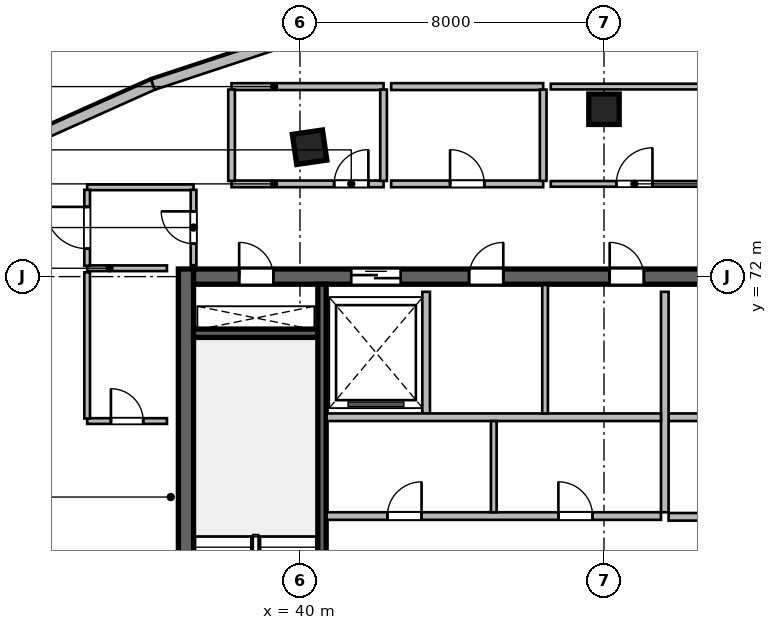
"""IFC4 building model, lengths in metres.
Left out: names, types, materials, properties, quantities, classifications, styles, units other than length and angle.
Written with IfcOpenShell. Run it as: python <this file> out.ifc"""

import sys

from ifc_helpers import new_model, si_unit, direction, frame, frame_2d, origin, origin_2d, place, context, subcontext, project, spatial, rectangle, extrude, source, transform, mapped, element, fill, save


model = new_model("IFC4")
c1 = context("Model", 3, precision=1e-05, world=origin(), true_north=direction((0.0, 1.0)))
c2 = subcontext(c1, "Body", "Model", "MODEL_VIEW")
j1 = project(units=[si_unit("LENGTHUNIT", "METRE"), si_unit("PLANEANGLEUNIT", "RADIAN")], contexts=[c1])
p1 = place(None, origin())
s1 = spatial("IfcSite", under=j1, at=p1, CompositionType="ELEMENT")
p2 = place(p1, origin())
s2 = spatial("IfcBuilding", under=s1, at=p2, CompositionType="ELEMENT")
p3 = place(p2, frame((0.0, 0.0, 264.0)))
s3 = spatial("IfcBuildingStorey", under=s2, at=p3, CompositionType="ELEMENT", Elevation=264.0)
m1 = source(origin(), c2, "Body", "SweptSolid", [
    extrude(rectangle(XDim=12.0, YDim=0.4, at=frame_2d((6.0, 0.0))), origin(), (0.0, 0.0, 1.0), 3.9),
])
p4 = place(p3, frame((37.0, 60.2, 0.0), z_axis=(0.0, 0.0, 1.0), x_axis=(0.0, 1.0, 0.0)))
e1 = element("IfcWall", 1, at=p4, inside=s3, PredefinedType="SHEAR", context=c2, shape_type="MappedRepresentation", body=[
    mapped(m1, transform((0.0, 0.0, 0.0), scale=1.0)),
])
m2 = source(origin(), c2, "Body", "SweptSolid", [
    extrude(rectangle(XDim=21.6, YDim=0.4, at=frame_2d((10.8, 0.0))), origin(), (0.0, 0.0, 1.0), 3.9),
])
p5 = place(p3, frame((37.2, 72.0, 0.0), z_axis=(0.0, 0.0, 1.0), x_axis=(1.0, 0.0, 0.0)))
e2 = element("IfcWall", 2, at=p5, inside=s3, PredefinedType="SHEAR", context=c2, shape_type="MappedRepresentation", body=[
    mapped(m2, transform((0.0, 0.0, 0.0), scale=1.0)),
])
p6 = place(p5, frame((1.2, 0.0, 0.0)))
e3 = element("IfcOpeningElement", 3, at=p6, cuts=e2, PredefinedType="OPENING", context=c2, shape_type="SweptSolid", body=[
    extrude(rectangle(XDim=0.9, YDim=2.1, at=frame_2d((0.45, 1.05))), frame((0.0, 0.21, 0.0), z_axis=(0.0, -1.0, 0.0), x_axis=(1.0, 0.0, 0.0)), (0.0, 0.0, 1.0), 0.42),
])
p7 = place(p5, frame((14.7, 0.0, 0.0)))
e4 = element("IfcOpeningElement", 4, at=p7, cuts=e2, PredefinedType="OPENING", context=c2, shape_type="SweptSolid", body=[
    extrude(rectangle(XDim=1.2, YDim=2.15, at=frame_2d((0.6, 1.075))), frame((0.0, 0.21, 0.0), z_axis=(0.0, -1.0, 0.0), x_axis=(1.0, 0.0, 0.0)), (0.0, 0.0, 1.0), 0.42),
])
p8 = place(p5, frame((4.15, 0.0, 0.0)))
e5 = element("IfcOpeningElement", 5, at=p8, cuts=e2, PredefinedType="OPENING", context=c2, shape_type="SweptSolid", body=[
    extrude(rectangle(XDim=1.3, YDim=2.15, at=frame_2d((0.65, 1.075))), frame((0.0, 0.21, 0.0), z_axis=(0.0, -1.0, 0.0), x_axis=(1.0, 0.0, 0.0)), (0.0, 0.0, 1.0), 0.42),
])
p9 = place(p5, frame((7.25, 0.0, 0.0)))
e6 = element("IfcOpeningElement", 6, at=p9, cuts=e2, PredefinedType="OPENING", context=c2, shape_type="SweptSolid", body=[
    extrude(rectangle(XDim=0.9, YDim=2.1, at=frame_2d((0.45, 1.05))), frame((0.0, 0.21, 0.0), z_axis=(0.0, -1.0, 0.0), x_axis=(1.0, 0.0, 0.0)), (0.0, 0.0, 1.0), 0.42),
])
p10 = place(p5, frame((10.95, 0.0, 0.0)))
e7 = element("IfcOpeningElement", 7, at=p10, cuts=e2, PredefinedType="OPENING", context=c2, shape_type="SweptSolid", body=[
    extrude(rectangle(XDim=0.9, YDim=2.1, at=frame_2d((0.45, 1.05))), frame((0.0, 0.21, 0.0), z_axis=(0.0, -1.0, 0.0), x_axis=(1.0, 0.0, 0.0)), (0.0, 0.0, 1.0), 0.42),
])
m3 = source(origin(), c2, "Body", "SweptSolid", [
    extrude(rectangle(XDim=3.27, YDim=0.22, at=frame_2d((1.635, 0.0))), origin(), (0.0, 0.0, 1.0), 3.9),
])
p11 = place(p3, frame((37.2, 70.51, 0.0), z_axis=(0.0, 0.0, 1.0), x_axis=(1.0, 0.0, 0.0)))
e8 = element("IfcWall", 8, at=p11, inside=s3, PredefinedType="SHEAR", context=c2, shape_type="MappedRepresentation", body=[
    mapped(m3, transform((0.0, 0.0, 0.0), scale=1.0)),
])
m4 = source(origin(), c2, "Body", "SweptSolid", [
    extrude(rectangle(XDim=11.2, YDim=0.22, at=frame_2d((5.6, 0.0))), origin(), (0.0, 0.0, 1.0), 3.9),
])
p12 = place(p3, frame((40.58, 60.6, 0.0), z_axis=(0.0, 0.0, 1.0), x_axis=(0.0, 1.0, 0.0)))
e9 = element("IfcWall", 9, at=p12, inside=s3, PredefinedType="SHEAR", context=c2, shape_type="MappedRepresentation", body=[
    mapped(m4, transform((0.0, 0.0, 0.0), scale=1.0)),
])
m5 = source(origin(), c2, "Body", "SweptSolid", [
    extrude(rectangle(XDim=0.8, YDim=0.8, at=origin_2d()), origin(), (0.0, 0.0, 1.0), 3.9),
])
for number, where, z_axis, x_axis in (
    (10, (40.253, 75.404, 0.0), (0.0, 0.0, 1.0), (-0.143, 0.99, 0.0)),
    (11, (48.0, 76.404, 0.0), (0.0, 0.0, 1.0), (0.0, 1.0, 0.0)),
):
    element("IfcColumn", number, at=place(p3, frame(where, z_axis=z_axis, x_axis=x_axis)), inside=s3, PredefinedType="COLUMN", context=c2, shape_type="MappedRepresentation", body=[
        mapped(m5, transform((0.0, 0.0, 0.0), scale=1.0)),
    ])
m6 = source(origin(), c2, "Body", "SweptSolid", [
    extrude(rectangle(XDim=3.599, YDim=0.28, at=frame_2d((1.799, 0.0))), origin(), (0.0, 0.0, 1.0), 3.65),
])
p13 = place(p3, frame((32.848, 75.579, 0.0), z_axis=(0.0, 0.0, 1.0), x_axis=(0.912714407797, 0.40859810303, 0.0)))
e12 = element("IfcWall", 12, at=p13, inside=s3, PredefinedType="SOLIDWALL", context=c2, shape_type="MappedRepresentation", body=[
    mapped(m6, transform((0.0, 0.0, 0.0), scale=1.0)),
])
m7 = source(origin(), c2, "Body", "SweptSolid", [
    extrude(rectangle(XDim=3.54, YDim=0.28, at=frame_2d((1.77, 0.0))), origin(), (0.0, 0.0, 1.0), 3.65),
])
p14 = place(p3, frame((36.132, 77.049, 0.0), z_axis=(0.0, 0.0, 1.0), x_axis=(0.949678507031, 0.313226329165, 0.0)))
e13 = element("IfcWall", 13, at=p14, inside=s3, PredefinedType="SOLIDWALL", context=c2, shape_type="MappedRepresentation", body=[
    mapped(m7, transform((0.0, 0.0, 0.0), scale=1.0)),
])
m8 = source(origin(), c2, "Body", "SweptSolid", [
    extrude(rectangle(XDim=5.62, YDim=0.2, at=frame_2d((2.81, 0.0))), origin(), (0.0, 0.0, 1.0), 3.65),
])
p15 = place(p3, frame((49.7, 68.3, 0.0), z_axis=(0.0, 0.0, 1.0), x_axis=(1.0, 0.0, 0.0)))
e14 = element("IfcWall", 14, at=p15, inside=s3, PredefinedType="SOLIDWALL", context=c2, shape_type="MappedRepresentation", body=[
    mapped(m8, transform((0.0, 0.0, 0.0), scale=1.0)),
])
p16 = place(p15, frame((1.6, 0.0, 0.0)))
e15 = element("IfcOpeningElement", 15, at=p16, cuts=e14, PredefinedType="OPENING", context=c2, shape_type="SweptSolid", body=[
    extrude(rectangle(XDim=1.1, YDim=2.15, at=frame_2d((0.55, 1.075))), frame((0.0, 0.11, 0.0), z_axis=(0.0, -1.0, 0.0), x_axis=(1.0, 0.0, 0.0)), (0.0, 0.0, 1.0), 0.22),
])
p17 = place(p15, frame((3.7, 0.0, 0.0)))
e16 = element("IfcOpeningElement", 16, at=p17, cuts=e14, PredefinedType="OPENING", context=c2, shape_type="SweptSolid", body=[
    extrude(rectangle(XDim=1.1, YDim=2.15, at=frame_2d((0.55, 1.075))), frame((0.0, 0.11, 0.0), z_axis=(0.0, -1.0, 0.0), x_axis=(1.0, 0.0, 0.0)), (0.0, 0.0, 1.0), 0.22),
])
m9 = source(origin(), c2, "Body", "SweptSolid", [
    extrude(rectangle(XDim=5.8, YDim=0.2, at=frame_2d((2.9, 0.0))), origin(), (0.0, 0.0, 1.0), 3.65),
])
p18 = place(p3, frame((49.6, 65.8, 0.0), z_axis=(0.0, 0.0, 1.0), x_axis=(0.0, 1.0, 0.0)))
e17 = element("IfcWall", 17, at=p18, inside=s3, PredefinedType="SOLIDWALL", context=c2, shape_type="MappedRepresentation", body=[
    mapped(m9, transform((0.0, 0.0, 0.0), scale=1.0)),
])
p19 = place(p3, frame((49.7, 65.68, 0.0), z_axis=(0.0, 0.0, 1.0), x_axis=(1.0, 0.0, 0.0)))
e18 = element("IfcWall", 18, at=p19, inside=s3, PredefinedType="SOLIDWALL", context=c2, shape_type="MappedRepresentation", body=[
    mapped(m8, transform((0.0, 0.0, 0.0), scale=1.0)),
])
m10 = source(origin(), c2, "Body", "SweptSolid", [
    extrude(rectangle(XDim=3.2, YDim=0.2, at=frame_2d((1.6, 0.0))), origin(), (0.0, 0.0, 1.0), 3.65),
])
p20 = place(p3, frame((43.32, 68.4, 0.0), z_axis=(0.0, 0.0, 1.0), x_axis=(0.0, 1.0, 0.0)))
e19 = element("IfcWall", 19, at=p20, inside=s3, PredefinedType="SOLIDWALL", context=c2, shape_type="MappedRepresentation", body=[
    mapped(m10, transform((0.0, 0.0, 0.0), scale=1.0)),
])
m11 = source(origin(), c2, "Body", "SweptSolid", [
    extrude(rectangle(XDim=8.8, YDim=0.2, at=frame_2d((4.4, 0.0))), origin(), (0.0, 0.0, 1.0), 3.65),
])
p21 = place(p3, frame((40.7, 68.3, 0.0), z_axis=(0.0, 0.0, 1.0), x_axis=(1.0, 0.0, 0.0)))
e20 = element("IfcWall", 20, at=p21, inside=s3, PredefinedType="SOLIDWALL", context=c2, shape_type="MappedRepresentation", body=[
    mapped(m11, transform((0.0, 0.0, 0.0), scale=1.0)),
])
m12 = source(origin(), c2, "Body", "SweptSolid", [
    extrude(rectangle(XDim=3.38, YDim=0.15, at=frame_2d((1.69, 0.0))), origin(), (0.0, 0.0, 1.0), 3.65),
])
p22 = place(p3, frame((46.45, 68.4, 0.0), z_axis=(0.0, 0.0, 1.0), x_axis=(0.0, 1.0, 0.0)))
e21 = element("IfcWall", 21, at=p22, inside=s3, PredefinedType="PARTITIONING", context=c2, shape_type="MappedRepresentation", body=[
    mapped(m12, transform((0.0, 0.0, 0.0), scale=1.0)),
])
p23 = place(p3, frame((40.7, 65.7, 0.0), z_axis=(0.0, 0.0, 1.0), x_axis=(1.0, 0.0, 0.0)))
e22 = element("IfcWall", 22, at=p23, inside=s3, PredefinedType="SOLIDWALL", context=c2, shape_type="MappedRepresentation", body=[
    mapped(m11, transform((0.0, 0.0, 0.0), scale=1.0)),
])
p24 = place(p23, frame((1.6, 0.0, 0.0)))
e23 = element("IfcOpeningElement", 23, at=p24, cuts=e22, PredefinedType="OPENING", context=c2, shape_type="SweptSolid", body=[
    extrude(rectangle(XDim=0.9, YDim=2.1, at=frame_2d((0.45, 1.05))), frame((0.0, 0.11, 0.0), z_axis=(0.0, -1.0, 0.0), x_axis=(1.0, 0.0, 0.0)), (0.0, 0.0, 1.0), 0.22),
])
p25 = place(p23, frame((6.1, 0.0, 0.0)))
e24 = element("IfcOpeningElement", 24, at=p25, cuts=e22, PredefinedType="OPENING", context=c2, shape_type="SweptSolid", body=[
    extrude(rectangle(XDim=0.9, YDim=2.1, at=frame_2d((0.45, 1.05))), frame((0.0, 0.11, 0.0), z_axis=(0.0, -1.0, 0.0), x_axis=(1.0, 0.0, 0.0)), (0.0, 0.0, 1.0), 0.22),
])
m13 = source(origin(), c2, "Body", "SweptSolid", [
    extrude(rectangle(XDim=2.4, YDim=0.15, at=frame_2d((1.2, 0.0))), origin(), (0.0, 0.0, 1.0), 3.65),
])
p26 = place(p3, frame((45.1, 65.8, 0.0), z_axis=(0.0, 0.0, 1.0), x_axis=(0.0, 1.0, 0.0)))
e25 = element("IfcWall", 25, at=p26, inside=s3, PredefinedType="PARTITIONING", context=c2, shape_type="MappedRepresentation", body=[
    mapped(m13, transform((0.0, 0.0, 0.0), scale=1.0)),
])
m14 = source(origin(), c2, "Body", "SweptSolid", [
    extrude(rectangle(XDim=2.1, YDim=0.15, at=frame_2d((1.05, 0.0))), origin(), (0.0, 0.0, 1.0), 3.65),
])
p27 = place(p3, frame((34.4, 72.22, 0.0), z_axis=(0.0, 0.0, 1.0), x_axis=(1.0, 0.0, 0.0)))
e26 = element("IfcWall", 26, at=p27, inside=s3, PredefinedType="PARTITIONING", context=c2, shape_type="MappedRepresentation", body=[
    mapped(m14, transform((0.0, 0.0, 0.0), scale=1.0)),
])
m15 = source(origin(), c2, "Body", "SweptSolid", [
    extrude(rectangle(XDim=2.8, YDim=0.15, at=frame_2d((1.4, 0.0))), origin(), (0.0, 0.0, 1.0), 3.65),
])
p28 = place(p3, frame((34.4, 74.35, 0.0), z_axis=(0.0, 0.0, 1.0), x_axis=(1.0, 0.0, 0.0)))
e27 = element("IfcWall", 27, at=p28, inside=s3, PredefinedType="PARTITIONING", context=c2, shape_type="MappedRepresentation", body=[
    mapped(m15, transform((0.0, 0.0, 0.0), scale=1.0)),
])
m16 = source(origin(), c2, "Body", "SweptSolid", [
    extrude(rectangle(XDim=1.995, YDim=0.15, at=frame_2d((0.998, 0.0))), origin(), (0.0, 0.0, 1.0), 3.65),
])
p29 = place(p3, frame((34.4, 72.288, 0.0), z_axis=(0.0, 0.0, 1.0), x_axis=(0.0, 1.0, 0.0)))
e28 = element("IfcWall", 28, at=p29, inside=s3, PredefinedType="PARTITIONING", context=c2, shape_type="MappedRepresentation", body=[
    mapped(m16, transform((0.0, 0.0, 0.0), scale=1.0)),
])
p30 = place(p29, frame((0.448, 0.0, 0.0)))
e29 = element("IfcOpeningElement", 29, at=p30, cuts=e28, PredefinedType="OPENING", context=c2, shape_type="SweptSolid", body=[
    extrude(rectangle(XDim=1.1, YDim=2.15, at=frame_2d((0.55, 1.075))), frame((0.0, 0.085, 0.0), z_axis=(0.0, -1.0, 0.0), x_axis=(1.0, 0.0, 0.0)), (0.0, 0.0, 1.0), 0.17),
])
m17 = source(origin(), c2, "Body", "SweptSolid", [
    extrude(rectangle(XDim=1.982, YDim=0.15, at=frame_2d((0.991, 0.0))), origin(), (0.0, 0.0, 1.0), 3.65),
])
p31 = place(p3, frame((37.2, 72.3, 0.0), z_axis=(0.0, 0.0, 1.0), x_axis=(0.0, 1.0, 0.0)))
e30 = element("IfcWall", 30, at=p31, inside=s3, PredefinedType="PARTITIONING", context=c2, shape_type="MappedRepresentation", body=[
    mapped(m17, transform((0.0, 0.0, 0.0), scale=1.0)),
])
p32 = place(p31, frame((0.566, 0.0, 0.0)))
e31 = element("IfcOpeningElement", 31, at=p32, cuts=e30, PredefinedType="OPENING", context=c2, shape_type="SweptSolid", body=[
    extrude(rectangle(XDim=0.85, YDim=2.1, at=frame_2d((0.425, 1.05))), frame((0.0, 0.085, 0.0), z_axis=(0.0, -1.0, 0.0), x_axis=(1.0, 0.0, 0.0)), (0.0, 0.0, 1.0), 0.17),
])
p33 = place(p3, frame((34.4, 68.2, 0.0), z_axis=(0.0, 0.0, 1.0), x_axis=(1.0, 0.0, 0.0)))
e32 = element("IfcWall", 32, at=p33, inside=s3, PredefinedType="PARTITIONING", context=c2, shape_type="MappedRepresentation", body=[
    mapped(m14, transform((0.0, 0.0, 0.0), scale=1.0)),
])
p34 = place(p33, frame((0.625, 0.0, 0.0)))
e33 = element("IfcOpeningElement", 33, at=p34, cuts=e32, PredefinedType="OPENING", context=c2, shape_type="SweptSolid", body=[
    extrude(rectangle(XDim=0.85, YDim=2.1, at=frame_2d((0.425, 1.05))), frame((0.0, 0.085, 0.0), z_axis=(0.0, -1.0, 0.0), x_axis=(1.0, 0.0, 0.0)), (0.0, 0.0, 1.0), 0.17),
])
m18 = source(origin(), c2, "Body", "SweptSolid", [
    extrude(rectangle(XDim=3.845, YDim=0.15, at=frame_2d((1.922, 0.0))), origin(), (0.0, 0.0, 1.0), 3.65),
])
p35 = place(p3, frame((34.4, 68.268, 0.0), z_axis=(0.0, 0.0, 1.0), x_axis=(0.0, 1.0, 0.0)))
e34 = element("IfcWall", 34, at=p35, inside=s3, PredefinedType="PARTITIONING", context=c2, shape_type="MappedRepresentation", body=[
    mapped(m18, transform((0.0, 0.0, 0.0), scale=1.0)),
])
m19 = source(origin(), c2, "Body", "SweptSolid", [
    extrude(rectangle(XDim=4.0, YDim=0.175, at=frame_2d((2.0, 0.0))), origin(), (0.0, 0.0, 1.0), 3.65),
])
p36 = place(p3, frame((38.2, 74.44, 0.0), z_axis=(0.0, 0.0, 1.0), x_axis=(1.0, 0.0, 0.0)))
e35 = element("IfcWall", 35, at=p36, inside=s3, PredefinedType="PARTITIONING", context=c2, shape_type="MappedRepresentation", body=[
    mapped(m19, transform((0.0, 0.0, 0.0), scale=1.0)),
])
p37 = place(p36, frame((2.7, 0.0, 0.0)))
e36 = element("IfcOpeningElement", 36, at=p37, cuts=e35, PredefinedType="OPENING", context=c2, shape_type="SweptSolid", body=[
    extrude(rectangle(XDim=0.9, YDim=2.08, at=frame_2d((0.45, 1.04))), frame((0.0, 0.098, 0.0), z_axis=(0.0, -1.0, 0.0), x_axis=(1.0, 0.0, 0.0)), (0.0, 0.0, 1.0), 0.195),
])
m20 = source(origin(), c2, "Body", "SweptSolid", [
    extrude(rectangle(XDim=4.0, YDim=0.18, at=frame_2d((2.0, 0.0))), origin(), (0.0, 0.0, 1.0), 3.65),
])
p38 = place(p3, frame((38.2, 77.0, 0.0), z_axis=(0.0, 0.0, 1.0), x_axis=(1.0, 0.0, 0.0)))
e37 = element("IfcWall", 37, at=p38, inside=s3, PredefinedType="PLUMBINGWALL", context=c2, shape_type="MappedRepresentation", body=[
    mapped(m20, transform((0.0, 0.0, 0.0), scale=1.0)),
])
m21 = source(origin(), c2, "Body", "SweptSolid", [
    extrude(rectangle(XDim=2.403, YDim=0.175, at=frame_2d((1.201, 0.0))), origin(), (0.0, 0.0, 1.0), 3.65),
])
for number, where, z_axis, x_axis in (
    (38, (38.2, 74.519, 0.0), (0.0, 0.0, 1.0), (0.0, 1.0, 0.0)),
    (39, (42.2, 74.519, 0.0), (0.0, 0.0, 1.0), (0.0, 1.0, 0.0)),
):
    element("IfcWall", number, at=place(p3, frame(where, z_axis=z_axis, x_axis=x_axis)), inside=s3, PredefinedType="PARTITIONING", context=c2, shape_type="MappedRepresentation", body=[
        mapped(m21, transform((0.0, 0.0, 0.0), scale=1.0)),
    ])
p39 = place(p3, frame((42.4, 74.44, 0.0), z_axis=(0.0, 0.0, 1.0), x_axis=(1.0, 0.0, 0.0)))
e40 = element("IfcWall", 40, at=p39, inside=s3, PredefinedType="PARTITIONING", context=c2, shape_type="MappedRepresentation", body=[
    mapped(m19, transform((0.0, 0.0, 0.0), scale=1.0)),
])
p40 = place(p39, frame((1.55, 0.0, 0.0)))
e41 = element("IfcOpeningElement", 41, at=p40, cuts=e40, PredefinedType="OPENING", context=c2, shape_type="SweptSolid", body=[
    extrude(rectangle(XDim=0.9, YDim=2.08, at=frame_2d((0.45, 1.04))), frame((0.0, 0.098, 0.0), z_axis=(0.0, -1.0, 0.0), x_axis=(1.0, 0.0, 0.0)), (0.0, 0.0, 1.0), 0.195),
])
p41 = place(p3, frame((42.4, 77.0, 0.0), z_axis=(0.0, 0.0, 1.0), x_axis=(1.0, 0.0, 0.0)))
e42 = element("IfcWall", 42, at=p41, inside=s3, PredefinedType="PLUMBINGWALL", context=c2, shape_type="MappedRepresentation", body=[
    mapped(m20, transform((0.0, 0.0, 0.0), scale=1.0)),
])
p42 = place(p3, frame((46.4, 74.519, 0.0), z_axis=(0.0, 0.0, 1.0), x_axis=(0.0, 1.0, 0.0)))
e43 = element("IfcWall", 43, at=p42, inside=s3, PredefinedType="PARTITIONING", context=c2, shape_type="MappedRepresentation", body=[
    mapped(m21, transform((0.0, 0.0, 0.0), scale=1.0)),
])
m22 = source(origin(), c2, "Body", "SweptSolid", [
    extrude(rectangle(XDim=4.4, YDim=0.15, at=frame_2d((2.2, 0.0))), origin(), (0.0, 0.0, 1.0), 3.65),
])
p43 = place(p3, frame((46.6, 74.44, 0.0), z_axis=(0.0, 0.0, 1.0), x_axis=(1.0, 0.0, 0.0)))
e44 = element("IfcWall", 44, at=p43, inside=s3, PredefinedType="PARTITIONING", context=c2, shape_type="MappedRepresentation", body=[
    mapped(m22, transform((0.0, 0.0, 0.0), scale=1.0)),
])
p44 = place(p43, frame((1.725, 0.0, 0.0)))
e45 = element("IfcOpeningElement", 45, at=p44, cuts=e44, PredefinedType="OPENING", context=c2, shape_type="SweptSolid", body=[
    extrude(rectangle(XDim=0.95, YDim=2.1, at=frame_2d((0.475, 1.05))), frame((0.0, 0.085, 0.0), z_axis=(0.0, -1.0, 0.0), x_axis=(1.0, 0.0, 0.0)), (0.0, 0.0, 1.0), 0.17),
])
p45 = place(p3, frame((46.6, 77.0, 0.0), z_axis=(0.0, 0.0, 1.0), x_axis=(1.0, 0.0, 0.0)))
e46 = element("IfcWall", 46, at=p45, inside=s3, PredefinedType="PARTITIONING", context=c2, shape_type="MappedRepresentation", body=[
    mapped(m22, transform((0.0, 0.0, 0.0), scale=1.0)),
])
m23 = source(origin(), c2, "Body", "SweptSolid", [
    extrude(rectangle(XDim=0.9, YDim=2.1, at=frame_2d((0.45, 1.05))), frame((0.0, 0.025, 0.0), z_axis=(0.0, -1.0, 0.0), x_axis=(1.0, 0.0, 0.0)), (0.0, 0.0, 1.0), 0.05),
])
p46 = place(p6, origin())
e47 = element("IfcDoor", 47, at=p46, inside=s3, OperationType="SINGLE_SWING_LEFT", PredefinedType="DOOR", context=c2, shape_type="MappedRepresentation", body=[
    mapped(m23, transform((0.0, 0.0, 0.0), scale=1.0)),
])
fill(e3, e47)
m24 = source(origin(), c2, "Body", "SweptSolid", [
    extrude(rectangle(XDim=1.3, YDim=2.15, at=frame_2d((0.65, 1.075))), frame((0.0, 0.025, 0.0), z_axis=(0.0, -1.0, 0.0), x_axis=(1.0, 0.0, 0.0)), (0.0, 0.0, 1.0), 0.05),
])
p47 = place(p8, origin())
e48 = element("IfcDoor", 48, at=p47, inside=s3, OperationType="DOUBLE_DOOR_SLIDING", PredefinedType="DOOR", context=c2, shape_type="MappedRepresentation", body=[
    mapped(m24, transform((0.0, 0.0, 0.0), scale=1.0)),
])
fill(e5, e48)
p48 = place(p9, origin())
e49 = element("IfcDoor", 49, at=p48, inside=s3, OperationType="SINGLE_SWING_RIGHT", PredefinedType="DOOR", context=c2, shape_type="MappedRepresentation", body=[
    mapped(m23, transform((0.0, 0.0, 0.0), scale=1.0)),
])
fill(e6, e49)
p49 = place(p10, origin())
e50 = element("IfcDoor", 50, at=p49, inside=s3, OperationType="SINGLE_SWING_LEFT", PredefinedType="DOOR", context=c2, shape_type="MappedRepresentation", body=[
    mapped(m23, transform((0.0, 0.0, 0.0), scale=1.0)),
])
fill(e7, e50)
p50 = place(p24, origin())
e51 = element("IfcDoor", 51, at=p50, inside=s3, OperationType="SINGLE_SWING_RIGHT", PredefinedType="DOOR", context=c2, shape_type="MappedRepresentation", body=[
    mapped(m23, transform((0.0, 0.0, 0.0), scale=1.0)),
])
fill(e23, e51)
p51 = place(p25, origin())
e52 = element("IfcDoor", 52, at=p51, inside=s3, OperationType="SINGLE_SWING_LEFT", PredefinedType="DOOR", context=c2, shape_type="MappedRepresentation", body=[
    mapped(m23, transform((0.0, 0.0, 0.0), scale=1.0)),
])
fill(e24, e52)
m25 = source(origin(), c2, "Body", "SweptSolid", [
    extrude(rectangle(XDim=0.85, YDim=2.1, at=frame_2d((0.425, 1.05))), frame((0.0, 0.025, 0.0), z_axis=(0.0, -1.0, 0.0), x_axis=(1.0, 0.0, 0.0)), (0.0, 0.0, 1.0), 0.05),
])
p52 = place(p32, origin())
e53 = element("IfcDoor", 53, at=p52, inside=s3, OperationType="SINGLE_SWING_RIGHT", PredefinedType="DOOR", context=c2, shape_type="MappedRepresentation", body=[
    mapped(m25, transform((0.0, 0.0, 0.0), scale=1.0)),
])
fill(e31, e53)
p53 = place(p34, origin())
e54 = element("IfcDoor", 54, at=p53, inside=s3, OperationType="SINGLE_SWING_LEFT", PredefinedType="DOOR", context=c2, shape_type="MappedRepresentation", body=[
    mapped(m25, transform((0.0, 0.0, 0.0), scale=1.0)),
])
fill(e33, e54)
m26 = source(origin(), c2, "Body", "SweptSolid", [
    extrude(rectangle(XDim=0.9, YDim=2.08, at=frame_2d((0.45, 1.04))), frame((0.0, 0.025, 0.0), z_axis=(0.0, -1.0, 0.0), x_axis=(1.0, 0.0, 0.0)), (0.0, 0.0, 1.0), 0.05),
])
p54 = place(p37, origin())
e55 = element("IfcDoor", 55, at=p54, inside=s3, OperationType="SINGLE_SWING_RIGHT", PredefinedType="DOOR", context=c2, shape_type="MappedRepresentation", body=[
    mapped(m26, transform((0.0, 0.0, 0.0), scale=1.0)),
])
fill(e36, e55)
p55 = place(p40, origin())
e56 = element("IfcDoor", 56, at=p55, inside=s3, OperationType="SINGLE_SWING_LEFT", PredefinedType="DOOR", context=c2, shape_type="MappedRepresentation", body=[
    mapped(m26, transform((0.0, 0.0, 0.0), scale=1.0)),
])
fill(e41, e56)
m27 = source(origin(), c2, "Body", "SweptSolid", [
    extrude(rectangle(XDim=0.95, YDim=2.1, at=frame_2d((0.475, 1.05))), frame((0.0, 0.025, 0.0), z_axis=(0.0, -1.0, 0.0), x_axis=(1.0, 0.0, 0.0)), (0.0, 0.0, 1.0), 0.05),
])
p56 = place(p44, origin())
e57 = element("IfcDoor", 57, at=p56, inside=s3, OperationType="SINGLE_SWING_RIGHT", PredefinedType="DOOR", context=c2, shape_type="MappedRepresentation", body=[
    mapped(m27, transform((0.0, 0.0, 0.0), scale=1.0)),
])
fill(e45, e57)
m28 = source(origin(), c2, "Body", "SweptSolid", [
    extrude(rectangle(XDim=1.1, YDim=2.15, at=frame_2d((0.55, 1.075))), frame((0.0, 0.025, 0.0), z_axis=(0.0, -1.0, 0.0), x_axis=(1.0, 0.0, 0.0)), (0.0, 0.0, 1.0), 0.05),
])
p57 = place(p30, origin())
e58 = element("IfcDoor", 58, at=p57, inside=s3, OperationType="SINGLE_SWING_RIGHT", PredefinedType="DOOR", context=c2, shape_type="MappedRepresentation", body=[
    mapped(m28, transform((0.0, 0.0, 0.0), scale=1.0)),
])
fill(e29, e58)
save(model, sys.argv[1])
